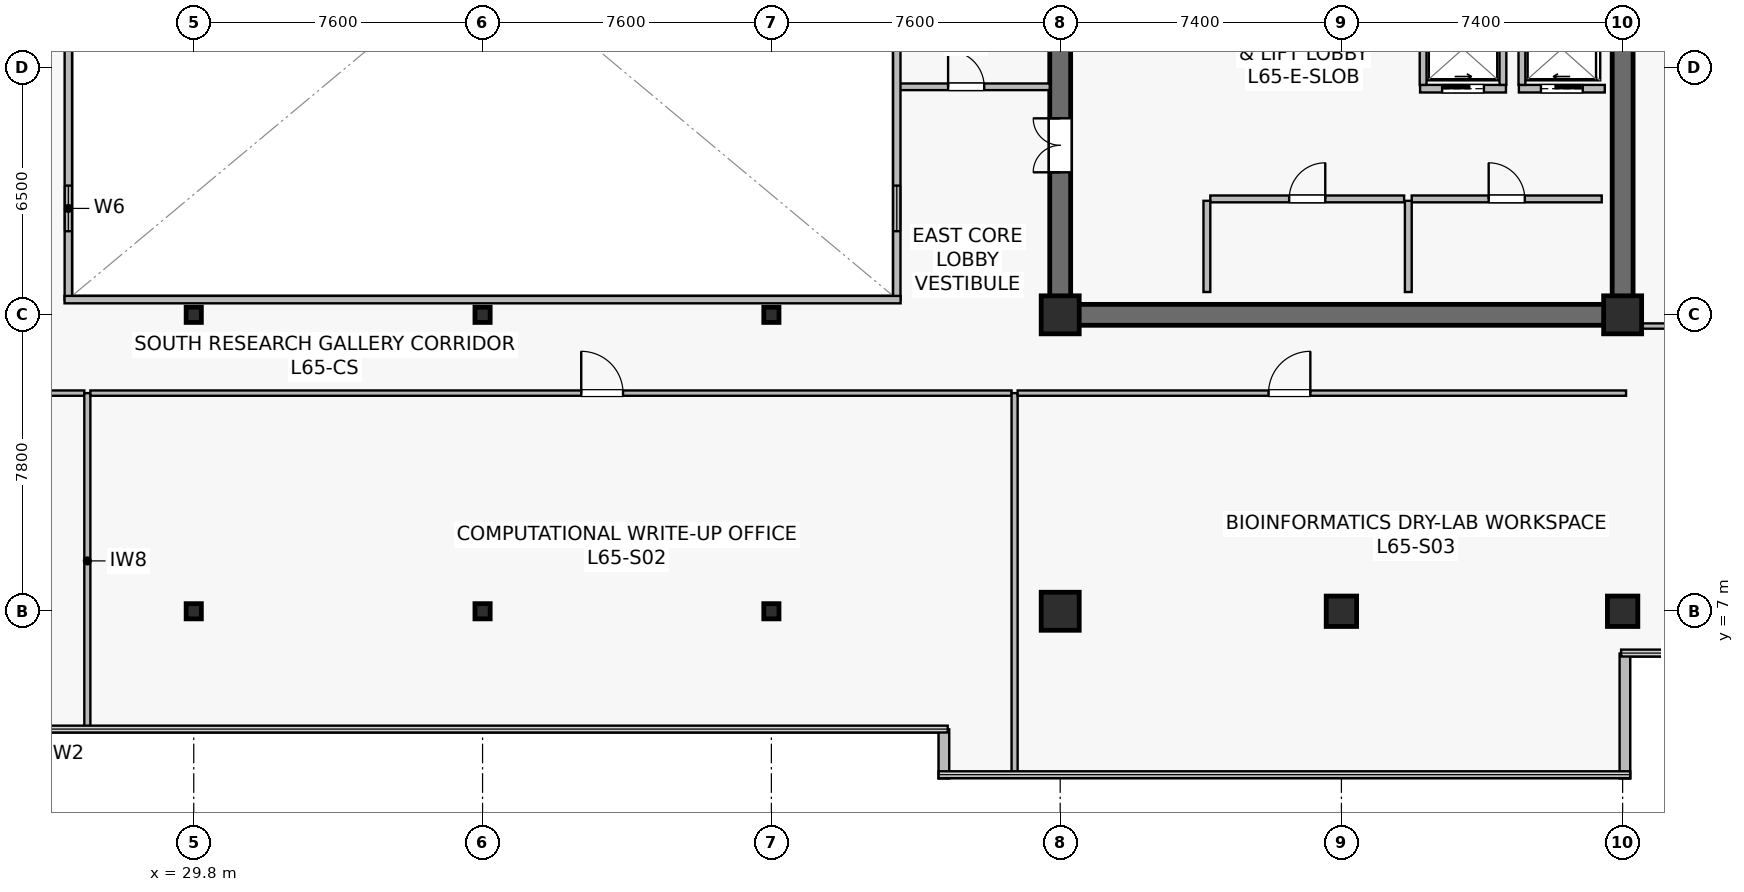
"""IFC4 building model, lengths in metres.
Left out: names, types, materials, properties, quantities, classifications, styles, units other than length and angle.
Written with IfcOpenShell. Run it as: python <this file> out.ifc"""

import sys

from ifc_helpers import new_model, si_unit, direction, frame, frame_2d, origin, origin_2d, place, context, subcontext, project, spatial, rectangle, hollow_rectangle, extrude, source, transform, mapped, element, fill, save


model = new_model("IFC4")
c1 = context("Model", 3, precision=1e-05, world=origin(), true_north=direction((0.0, 1.0)))
c2 = subcontext(c1, "Body", "Model", "MODEL_VIEW")
j1 = project(units=[si_unit("LENGTHUNIT", "METRE"), si_unit("PLANEANGLEUNIT", "RADIAN")], contexts=[c1])
p1 = place(None, origin())
s1 = spatial("IfcSite", under=j1, at=p1, CompositionType="ELEMENT")
p2 = place(p1, origin())
s2 = spatial("IfcBuilding", under=s1, at=p2, CompositionType="ELEMENT")
p3 = place(p2, frame((0.0, 0.0, 271.1)))
s3 = spatial("IfcBuildingStorey", under=s2, at=p3, CompositionType="ELEMENT", Elevation=271.1)
p4 = place(p3, frame((52.325, 14.8, 0.0), z_axis=(0.0, 0.0, 1.0), x_axis=(1.0, 0.0, 0.0)))
e1 = element("IfcWall", 1, at=p4, inside=s3, PredefinedType="SHEAR", context=c2, shape_type="SweptSolid", body=[
    extrude(rectangle(XDim=15.35, YDim=0.55, at=frame_2d((7.675, 0.0))), origin(), (0.0, 0.0, 1.0), 3.8),
])
p5 = place(p3, frame((52.6, 15.075, 0.0), z_axis=(0.0, 0.0, 1.0), x_axis=(0.0, 1.0, 0.0)))
e2 = element("IfcWall", 2, at=p5, inside=s3, PredefinedType="SHEAR", context=c2, shape_type="SweptSolid", body=[
    extrude(rectangle(XDim=18.45, YDim=0.55, at=frame_2d((9.225, 0.0))), origin(), (0.0, 0.0, 1.0), 3.8),
])
p6 = place(p5, frame((3.475, 0.0, 0.0)))
e3 = element("IfcOpeningElement", 3, at=p6, cuts=e2, PredefinedType="OPENING", context=c2, shape_type="SweptSolid", body=[
    extrude(rectangle(XDim=1.42, YDim=2.2, at=frame_2d((0.71, 1.1))), frame((0.0, 0.285, 0.0), z_axis=(0.0, -1.0, 0.0), x_axis=(1.0, 0.0, 0.0)), (0.0, 0.0, 1.0), 0.57),
])
p7 = place(p3, frame((67.4, 15.075, 0.0), z_axis=(0.0, 0.0, 1.0), x_axis=(0.0, 1.0, 0.0)))
e4 = element("IfcWall", 4, at=p7, inside=s3, PredefinedType="SHEAR", context=c2, shape_type="SweptSolid", body=[
    extrude(rectangle(XDim=18.45, YDim=0.55, at=frame_2d((9.225, 0.0))), origin(), (0.0, 0.0, 1.0), 3.8),
])
m1 = source(origin(), c2, "Body", "SweptSolid", [
    extrude(rectangle(XDim=1.0, YDim=1.0, at=origin_2d()), origin(), (0.0, 0.0, 1.0), 4.1),
])
p8 = place(p3, frame((52.6, 7.0, 0.0), z_axis=(0.0, 0.0, 1.0), x_axis=(1.0, 0.0, 0.0)))
e5 = element("IfcColumn", 5, at=p8, inside=s3, PredefinedType="COLUMN", context=c2, shape_type="MappedRepresentation", body=[
    mapped(m1, transform((0.0, 0.0, 0.0), scale=1.0)),
])
m2 = source(origin(), c2, "Body", "SweptSolid", [
    extrude(rectangle(XDim=0.8, YDim=0.8, at=origin_2d()), origin(), (0.0, 0.0, 1.0), 4.1),
])
p9 = place(p3, frame((60.0, 7.0, 0.0), z_axis=(0.0, 0.0, 1.0), x_axis=(1.0, 0.0, 0.0)))
e6 = element("IfcColumn", 6, at=p9, inside=s3, PredefinedType="COLUMN", context=c2, shape_type="MappedRepresentation", body=[
    mapped(m2, transform((0.0, 0.0, 0.0), scale=1.0)),
])
for number, where, z_axis, x_axis in (
    (7, (52.6, 14.8, 0.0), (0.0, 0.0, 1.0), (1.0, 0.0, 0.0)),
    (8, (67.4, 14.8, 0.0), (0.0, 0.0, 1.0), (1.0, 0.0, 0.0)),
):
    element("IfcColumn", number, at=place(p3, frame(where, z_axis=z_axis, x_axis=x_axis)), inside=s3, PredefinedType="COLUMN", context=c2, shape_type="MappedRepresentation", body=[
        mapped(m1, transform((0.0, 0.0, 0.0), scale=1.0)),
    ])
p10 = place(p3, frame((67.4, 7.0, 0.0), z_axis=(0.0, 0.0, 1.0), x_axis=(1.0, 0.0, 0.0)))
e9 = element("IfcColumn", 9, at=p10, inside=s3, PredefinedType="COLUMN", context=c2, shape_type="MappedRepresentation", body=[
    mapped(m2, transform((0.0, 0.0, 0.0), scale=1.0)),
])
m3 = source(origin(), c2, "Body", "SweptSolid", [
    extrude(hollow_rectangle(XDim=0.4, YDim=0.4, WallThickness=0.019, at=origin_2d()), origin(), (0.0, 0.0, 1.0), 4.1),
])
for number, where, z_axis, x_axis in (
    (10, (29.8, 7.0, 0.0), (0.0, 0.0, 1.0), (1.0, 0.0, 0.0)),
    (11, (29.8, 14.8, 0.0), (0.0, 0.0, 1.0), (1.0, 0.0, 0.0)),
    (12, (37.4, 7.0, 0.0), (0.0, 0.0, 1.0), (1.0, 0.0, 0.0)),
    (13, (37.4, 14.8, 0.0), (0.0, 0.0, 1.0), (1.0, 0.0, 0.0)),
    (14, (45.0, 7.0, 0.0), (0.0, 0.0, 1.0), (1.0, 0.0, 0.0)),
    (15, (45.0, 14.8, 0.0), (0.0, 0.0, 1.0), (1.0, 0.0, 0.0)),
):
    element("IfcColumn", number, at=place(p3, frame(where, z_axis=z_axis, x_axis=x_axis)), inside=s3, PredefinedType="COLUMN", context=c2, shape_type="MappedRepresentation", body=[
        mapped(m3, transform((0.0, 0.0, 0.0), scale=1.0)),
    ])
p11 = place(p3, frame((49.54, 3.893, 0.0), z_axis=(0.0, 0.0, 1.0), x_axis=(0.0, -1.0, 0.0)))
e16 = element("IfcWall", 16, at=p11, inside=s3, PredefinedType="STANDARD", context=c2, shape_type="SweptSolid", body=[
    extrude(rectangle(XDim=1.293, YDim=0.28, at=frame_2d((0.646, 0.0))), origin(), (0.0, 0.0, 1.0), 3.8),
])
p12 = place(p3, frame((67.46, 2.6, 0.0), z_axis=(0.0, 0.0, 1.0), x_axis=(0.0, 1.0, 0.0)))
e17 = element("IfcWall", 17, at=p12, inside=s3, PredefinedType="STANDARD", context=c2, shape_type="SweptSolid", body=[
    extrude(rectangle(XDim=3.288, YDim=0.28, at=frame_2d((1.644, 0.0))), origin(), (0.0, 0.0, 1.0), 3.8),
])
p13 = place(p3, frame((64.67, 20.75, 0.0), z_axis=(0.0, 0.0, 1.0), x_axis=(1.0, 0.0, 0.0)))
e18 = element("IfcWall", 18, at=p13, inside=s3, PredefinedType="SOLIDWALL", context=c2, shape_type="SweptSolid", body=[
    extrude(rectangle(XDim=2.26, YDim=0.2, at=frame_2d((1.13, 0.0))), origin(), (0.0, 0.0, 1.0), 3.8),
])
p14 = place(p13, frame((0.58, 0.0, 0.0)))
e19 = element("IfcOpeningElement", 19, at=p14, cuts=e18, PredefinedType="OPENING", context=c2, shape_type="SweptSolid", body=[
    extrude(rectangle(XDim=1.1, YDim=2.22, at=frame_2d((0.55, 1.11))), frame((0.0, 0.11, 0.0), z_axis=(0.0, -1.0, 0.0), x_axis=(1.0, 0.0, 0.0)), (0.0, 0.0, 1.0), 0.22),
])
p15 = place(p3, frame((64.75, 20.85, 0.0), z_axis=(0.0, 0.0, 1.0), x_axis=(0.0, 1.0, 0.0)))
e20 = element("IfcWall", 20, at=p15, inside=s3, PredefinedType="SOLIDWALL", context=c2, shape_type="SweptSolid", body=[
    extrude(rectangle(XDim=1.9, YDim=0.18, at=frame_2d((0.95, 0.0))), origin(), (0.0, 0.0, 1.0), 3.8),
])
p16 = place(p3, frame((62.07, 20.75, 0.0), z_axis=(0.0, 0.0, 1.0), x_axis=(1.0, 0.0, 0.0)))
e21 = element("IfcWall", 21, at=p16, inside=s3, PredefinedType="SOLIDWALL", context=c2, shape_type="SweptSolid", body=[
    extrude(rectangle(XDim=2.26, YDim=0.2, at=frame_2d((1.13, 0.0))), origin(), (0.0, 0.0, 1.0), 3.8),
])
p17 = place(p16, frame((0.58, 0.0, 0.0)))
e22 = element("IfcOpeningElement", 22, at=p17, cuts=e21, PredefinedType="OPENING", context=c2, shape_type="SweptSolid", body=[
    extrude(rectangle(XDim=1.1, YDim=2.22, at=frame_2d((0.55, 1.11))), frame((0.0, 0.11, 0.0), z_axis=(0.0, -1.0, 0.0), x_axis=(1.0, 0.0, 0.0)), (0.0, 0.0, 1.0), 0.22),
])
for number, where, z_axis, x_axis in (
    (23, (62.15, 20.85, 0.0), (0.0, 0.0, 1.0), (0.0, 1.0, 0.0)),
    (24, (64.25, 20.85, 0.0), (0.0, 0.0, 1.0), (0.0, 1.0, 0.0)),
):
    element("IfcWall", number, at=place(p3, frame(where, z_axis=z_axis, x_axis=x_axis)), inside=s3, PredefinedType="SOLIDWALL", context=c2, shape_type="SweptSolid", body=[
        extrude(rectangle(XDim=1.9, YDim=0.18, at=frame_2d((0.95, 0.0))), origin(), (0.0, 0.0, 1.0), 3.8),
    ])
p18 = place(p3, frame((61.85, 17.85, 0.0), z_axis=(0.0, 0.0, 1.0), x_axis=(1.0, 0.0, 0.0)))
e25 = element("IfcWall", 25, at=p18, inside=s3, PredefinedType="SOLIDWALL", context=c2, shape_type="SweptSolid", body=[
    extrude(rectangle(XDim=5.0, YDim=0.18, at=frame_2d((2.5, 0.0))), origin(), (0.0, 0.0, 1.0), 3.8),
])
p19 = place(p18, frame((2.025, 0.0, 0.0)))
e26 = element("IfcOpeningElement", 26, at=p19, cuts=e25, PredefinedType="OPENING", context=c2, shape_type="SweptSolid", body=[
    extrude(rectangle(XDim=0.95, YDim=2.15, at=frame_2d((0.475, 1.075))), frame((0.0, 0.1, 0.0), z_axis=(0.0, -1.0, 0.0), x_axis=(1.0, 0.0, 0.0)), (0.0, 0.0, 1.0), 0.2),
])
p20 = place(p3, frame((61.76, 15.4, 0.0), z_axis=(0.0, 0.0, 1.0), x_axis=(0.0, 1.0, 0.0)))
e27 = element("IfcWall", 27, at=p20, inside=s3, PredefinedType="SOLIDWALL", context=c2, shape_type="SweptSolid", body=[
    extrude(rectangle(XDim=2.4, YDim=0.18, at=frame_2d((1.2, 0.0))), origin(), (0.0, 0.0, 1.0), 3.8),
])
p21 = place(p3, frame((56.55, 17.85, 0.0), z_axis=(0.0, 0.0, 1.0), x_axis=(1.0, 0.0, 0.0)))
e28 = element("IfcWall", 28, at=p21, inside=s3, PredefinedType="SOLIDWALL", context=c2, shape_type="SweptSolid", body=[
    extrude(rectangle(XDim=5.1, YDim=0.18, at=frame_2d((2.55, 0.0))), origin(), (0.0, 0.0, 1.0), 3.197),
])
p22 = place(p21, frame((2.075, 0.0, 0.0)))
e29 = element("IfcOpeningElement", 29, at=p22, cuts=e28, PredefinedType="OPENING", context=c2, shape_type="SweptSolid", body=[
    extrude(rectangle(XDim=0.95, YDim=2.15, at=frame_2d((0.475, 1.075))), frame((0.0, 0.1, 0.0), z_axis=(0.0, -1.0, 0.0), x_axis=(1.0, 0.0, 0.0)), (0.0, 0.0, 1.0), 0.2),
])
p23 = place(p3, frame((56.46, 15.4, 0.0), z_axis=(0.0, 0.0, 1.0), x_axis=(0.0, 1.0, 0.0)))
e30 = element("IfcWall", 30, at=p23, inside=s3, PredefinedType="SOLIDWALL", context=c2, shape_type="SweptSolid", body=[
    extrude(rectangle(XDim=2.4, YDim=0.18, at=frame_2d((1.2, 0.0))), origin(), (0.0, 0.0, 1.0), 3.8),
])
p24 = place(p3, frame((48.3, 20.8, 0.0), z_axis=(0.0, 0.0, 1.0), x_axis=(1.0, 0.0, 0.0)))
e31 = element("IfcWall", 31, at=p24, inside=s3, PredefinedType="PARTITIONING", context=c2, shape_type="SweptSolid", body=[
    extrude(rectangle(XDim=4.025, YDim=0.175, at=frame_2d((2.012, 0.0))), origin(), (0.0, 0.0, 1.0), 3.8),
])
p25 = place(p24, frame((1.35, 0.0, 0.0)))
e32 = element("IfcOpeningElement", 32, at=p25, cuts=e31, PredefinedType="OPENING", context=c2, shape_type="SweptSolid", body=[
    extrude(rectangle(XDim=0.95, YDim=2.15, at=frame_2d((0.475, 1.075))), frame((0.0, 0.098, 0.0), z_axis=(0.0, -1.0, 0.0), x_axis=(1.0, 0.0, 0.0)), (0.0, 0.0, 1.0), 0.195),
])
p26 = place(p3, frame((26.5, 15.2, 0.0), z_axis=(0.0, 0.0, 1.0), x_axis=(0.0, 1.0, 0.0)))
e33 = element("IfcWall", 33, at=p26, inside=s3, PredefinedType="SOLIDWALL", context=c2, shape_type="SweptSolid", body=[
    extrude(rectangle(XDim=18.2, YDim=0.195, at=frame_2d((9.1, 0.0))), origin(), (0.0, 0.0, 1.0), 3.8),
])
p27 = place(p26, frame((1.8, 0.0, 0.9)))
e34 = element("IfcOpeningElement", 34, at=p27, cuts=e33, PredefinedType="OPENING", context=c2, shape_type="SweptSolid", body=[
    extrude(rectangle(XDim=1.2, YDim=1.35, at=frame_2d((0.6, 0.675))), frame((0.0, 0.107, 0.0), z_axis=(0.0, -1.0, 0.0), x_axis=(1.0, 0.0, 0.0)), (0.0, 0.0, 1.0), 0.215),
])
p28 = place(p26, frame((13.2, 0.0, 0.9)))
e35 = element("IfcOpeningElement", 35, at=p28, cuts=e33, PredefinedType="OPENING", context=c2, shape_type="SweptSolid", body=[
    extrude(rectangle(XDim=1.2, YDim=1.35, at=frame_2d((0.6, 0.675))), frame((0.0, 0.107, 0.0), z_axis=(0.0, -1.0, 0.0), x_axis=(1.0, 0.0, 0.0)), (0.0, 0.0, 1.0), 0.215),
])
p29 = place(p3, frame((48.3, 15.2, 0.0), z_axis=(0.0, 0.0, 1.0), x_axis=(0.0, 1.0, 0.0)))
e36 = element("IfcWall", 36, at=p29, inside=s3, PredefinedType="SOLIDWALL", context=c2, shape_type="SweptSolid", body=[
    extrude(rectangle(XDim=18.2, YDim=0.195, at=frame_2d((9.1, 0.0))), origin(), (0.0, 0.0, 1.0), 3.8),
])
p30 = place(p29, frame((1.8, 0.0, 0.9)))
e37 = element("IfcOpeningElement", 37, at=p30, cuts=e36, PredefinedType="OPENING", context=c2, shape_type="SweptSolid", body=[
    extrude(rectangle(XDim=1.2, YDim=1.35, at=frame_2d((0.6, 0.675))), frame((0.0, 0.107, 0.0), z_axis=(0.0, -1.0, 0.0), x_axis=(1.0, 0.0, 0.0)), (0.0, 0.0, 1.0), 0.215),
])
p31 = place(p29, frame((13.2, 0.0, 0.9)))
e38 = element("IfcOpeningElement", 38, at=p31, cuts=e36, PredefinedType="OPENING", context=c2, shape_type="SweptSolid", body=[
    extrude(rectangle(XDim=1.2, YDim=1.35, at=frame_2d((0.6, 0.675))), frame((0.0, 0.107, 0.0), z_axis=(0.0, -1.0, 0.0), x_axis=(1.0, 0.0, 0.0)), (0.0, 0.0, 1.0), 0.215),
])
p32 = place(p3, frame((26.4, 15.2, 0.0), z_axis=(0.0, 0.0, 1.0), x_axis=(1.0, 0.0, 0.0)))
e39 = element("IfcWall", 39, at=p32, inside=s3, PredefinedType="SOLIDWALL", context=c2, shape_type="SweptSolid", body=[
    extrude(rectangle(XDim=22.0, YDim=0.195, at=frame_2d((11.0, 0.0))), origin(), (0.0, 0.0, 1.0), 3.8),
])
p33 = place(p3, frame((7.31, 12.74, 0.0), z_axis=(0.0, 0.0, 1.0), x_axis=(1.0, 0.0, 0.0)))
e40 = element("IfcWall", 40, at=p33, inside=s3, PredefinedType="PARTITIONING", context=c2, shape_type="SweptSolid", body=[
    extrude(rectangle(XDim=19.61, YDim=0.14, at=frame_2d((9.805, 0.0))), origin(), (0.0, 0.0, 1.0), 3.197),
])
p34 = place(p33, frame((8.186, 0.0, 0.0)))
e41 = element("IfcOpeningElement", 41, at=p34, cuts=e40, PredefinedType="OPENING", context=c2, shape_type="SweptSolid", body=[
    extrude(rectangle(XDim=1.1, YDim=2.18, at=frame_2d((0.55, 1.09))), frame((0.0, 0.08, 0.0), z_axis=(0.0, -1.0, 0.0), x_axis=(1.0, 0.0, 0.0)), (0.0, 0.0, 1.0), 0.16),
])
p35 = place(p3, frame((27.0, 3.91, 0.0), z_axis=(0.0, 0.0, 1.0), x_axis=(0.0, 1.0, 0.0)))
e42 = element("IfcWall", 42, at=p35, inside=s3, PredefinedType="PARTITIONING", context=c2, shape_type="SweptSolid", body=[
    extrude(rectangle(XDim=8.83, YDim=0.16, at=frame_2d((4.415, 0.0))), origin(), (0.0, 0.0, 1.0), 3.135),
])
p36 = place(p3, frame((27.08, 12.74, 0.0), z_axis=(0.0, 0.0, 1.0), x_axis=(1.0, 0.0, 0.0)))
e43 = element("IfcWall", 43, at=p36, inside=s3, PredefinedType="PARTITIONING", context=c2, shape_type="SweptSolid", body=[
    extrude(rectangle(XDim=24.24, YDim=0.14, at=frame_2d((12.12, 0.0))), origin(), (0.0, 0.0, 1.0), 3.197),
])
p37 = place(p36, frame((12.917, 0.0, 0.0)))
e44 = element("IfcOpeningElement", 44, at=p37, cuts=e43, PredefinedType="OPENING", context=c2, shape_type="SweptSolid", body=[
    extrude(rectangle(XDim=1.1, YDim=2.18, at=frame_2d((0.55, 1.09))), frame((0.0, 0.08, 0.0), z_axis=(0.0, -1.0, 0.0), x_axis=(1.0, 0.0, 0.0)), (0.0, 0.0, 1.0), 0.16),
])
p38 = place(p3, frame((51.4, 2.71, 0.0), z_axis=(0.0, 0.0, 1.0), x_axis=(0.0, 1.0, 0.0)))
e45 = element("IfcWall", 45, at=p38, inside=s3, PredefinedType="PARTITIONING", context=c2, shape_type="SweptSolid", body=[
    extrude(rectangle(XDim=10.03, YDim=0.16, at=frame_2d((5.015, 0.0))), origin(), (0.0, 0.0, 1.0), 3.135),
])
p39 = place(p3, frame((51.48, 12.74, 0.0), z_axis=(0.0, 0.0, 1.0), x_axis=(1.0, 0.0, 0.0)))
e46 = element("IfcWall", 46, at=p39, inside=s3, PredefinedType="PARTITIONING", context=c2, shape_type="SweptSolid", body=[
    extrude(rectangle(XDim=16.01, YDim=0.14, at=frame_2d((8.005, 0.0))), origin(), (0.0, 0.0, 1.0), 3.197),
])
p40 = place(p39, frame((6.602, 0.0, 0.0)))
e47 = element("IfcOpeningElement", 47, at=p40, cuts=e46, PredefinedType="OPENING", context=c2, shape_type="SweptSolid", body=[
    extrude(rectangle(XDim=1.1, YDim=2.18, at=frame_2d((0.55, 1.09))), frame((0.0, 0.08, 0.0), z_axis=(0.0, -1.0, 0.0), x_axis=(1.0, 0.0, 0.0)), (0.0, 0.0, 1.0), 0.16),
])
p41 = place(p3, frame((67.78, 14.505, 0.0), z_axis=(0.0, 0.0, 1.0), x_axis=(1.0, 0.0, 0.0)))
e48 = element("IfcWall", 48, at=p41, inside=s3, PredefinedType="PARTITIONING", context=c2, shape_type="SweptSolid", body=[
    extrude(rectangle(XDim=2.91, YDim=0.14, at=frame_2d((1.455, 0.0))), origin(), (0.0, 0.0, 1.0), 3.8),
])
p42 = place(p41, frame((1.005, 0.0, 0.0)))
e49 = element("IfcOpeningElement", 49, at=p42, cuts=e48, PredefinedType="OPENING", context=c2, shape_type="SweptSolid", body=[
    extrude(rectangle(XDim=0.9, YDim=2.1, at=frame_2d((0.45, 1.05))), frame((0.0, 0.08, 0.0), z_axis=(0.0, -1.0, 0.0), x_axis=(1.0, 0.0, 0.0)), (0.0, 0.0, 1.0), 0.16),
])
m4 = source(origin(), c2, "Body", "SweptSolid", [
    extrude(rectangle(XDim=1.2, YDim=1.35, at=frame_2d((0.6, 0.675))), frame((0.0, 0.03, 0.0), z_axis=(0.0, -1.0, 0.0), x_axis=(1.0, 0.0, 0.0)), (0.0, 0.0, 1.0), 0.06),
])
p43 = place(p27, origin())
e50 = element("IfcWindow", 50, at=p43, inside=s3, PartitioningType="SINGLE_PANEL", PredefinedType="WINDOW", context=c2, shape_type="MappedRepresentation", body=[
    mapped(m4, transform((0.0, 0.0, 0.0), scale=1.0)),
])
fill(e34, e50)
p44 = place(p30, origin())
e51 = element("IfcWindow", 51, at=p44, inside=s3, PartitioningType="SINGLE_PANEL", PredefinedType="WINDOW", context=c2, shape_type="MappedRepresentation", body=[
    mapped(m4, transform((0.0, 0.0, 0.0), scale=1.0)),
])
fill(e37, e51)
m5 = source(origin(), c2, "Body", "SweptSolid", [
    extrude(rectangle(XDim=1.1, YDim=2.22, at=frame_2d((0.55, 1.11))), frame((0.0, 0.025, 0.0), z_axis=(0.0, -1.0, 0.0), x_axis=(1.0, 0.0, 0.0)), (0.0, 0.0, 1.0), 0.05),
])
p45 = place(p14, origin())
e52 = element("IfcDoor", 52, at=p45, inside=s3, OperationType="SLIDING_TO_LEFT", PredefinedType="USERDEFINED", context=c2, shape_type="MappedRepresentation", body=[
    mapped(m5, transform((0.0, 0.0, 0.0), scale=1.0)),
])
fill(e19, e52)
p46 = place(p17, origin())
e53 = element("IfcDoor", 53, at=p46, inside=s3, OperationType="SLIDING_TO_RIGHT", PredefinedType="USERDEFINED", context=c2, shape_type="MappedRepresentation", body=[
    mapped(m5, transform((0.0, 0.0, 0.0), scale=1.0)),
])
fill(e22, e53)
m6 = source(origin(), c2, "Body", "SweptSolid", [
    extrude(rectangle(XDim=0.95, YDim=2.15, at=frame_2d((0.475, 1.075))), frame((0.0, 0.025, 0.0), z_axis=(0.0, -1.0, 0.0), x_axis=(1.0, 0.0, 0.0)), (0.0, 0.0, 1.0), 0.05),
])
p47 = place(p19, origin())
e54 = element("IfcDoor", 54, at=p47, inside=s3, OperationType="SINGLE_SWING_LEFT", PredefinedType="DOOR", context=c2, shape_type="MappedRepresentation", body=[
    mapped(m6, transform((0.0, 0.0, 0.0), scale=1.0)),
])
fill(e26, e54)
p48 = place(p22, origin())
e55 = element("IfcDoor", 55, at=p48, inside=s3, OperationType="SINGLE_SWING_RIGHT", PredefinedType="DOOR", context=c2, shape_type="MappedRepresentation", body=[
    mapped(m6, transform((0.0, 0.0, 0.0), scale=1.0)),
])
fill(e29, e55)
m7 = source(origin(), c2, "Body", "SweptSolid", [
    extrude(rectangle(XDim=1.42, YDim=2.2, at=frame_2d((0.71, 1.1))), frame((0.0, 0.025, 0.0), z_axis=(0.0, -1.0, 0.0), x_axis=(1.0, 0.0, 0.0)), (0.0, 0.0, 1.0), 0.05),
])
p49 = place(p6, origin())
e56 = element("IfcDoor", 56, at=p49, inside=s3, OperationType="DOUBLE_DOOR_SINGLE_SWING", PredefinedType="DOOR", context=c2, shape_type="MappedRepresentation", body=[
    mapped(m7, transform((0.0, 0.0, 0.0), scale=1.0)),
])
fill(e3, e56)
p50 = place(p25, origin())
e57 = element("IfcDoor", 57, at=p50, inside=s3, OperationType="SINGLE_SWING_LEFT", PredefinedType="DOOR", context=c2, shape_type="MappedRepresentation", body=[
    mapped(m6, transform((0.0, 0.0, 0.0), scale=1.0)),
])
fill(e32, e57)
m8 = source(origin(), c2, "Body", "SweptSolid", [
    extrude(rectangle(XDim=1.1, YDim=2.18, at=frame_2d((0.55, 1.09))), frame((0.0, 0.025, 0.0), z_axis=(0.0, -1.0, 0.0), x_axis=(1.0, 0.0, 0.0)), (0.0, 0.0, 1.0), 0.05),
])
p51 = place(p37, origin())
e58 = element("IfcDoor", 58, at=p51, inside=s3, OperationType="SINGLE_SWING_LEFT", PredefinedType="DOOR", context=c2, shape_type="MappedRepresentation", body=[
    mapped(m8, transform((0.0, 0.0, 0.0), scale=1.0)),
])
fill(e44, e58)
p52 = place(p40, origin())
e59 = element("IfcDoor", 59, at=p52, inside=s3, OperationType="SINGLE_SWING_RIGHT", PredefinedType="DOOR", context=c2, shape_type="MappedRepresentation", body=[
    mapped(m8, transform((0.0, 0.0, 0.0), scale=1.0)),
])
fill(e47, e59)
save(model, sys.argv[1])
